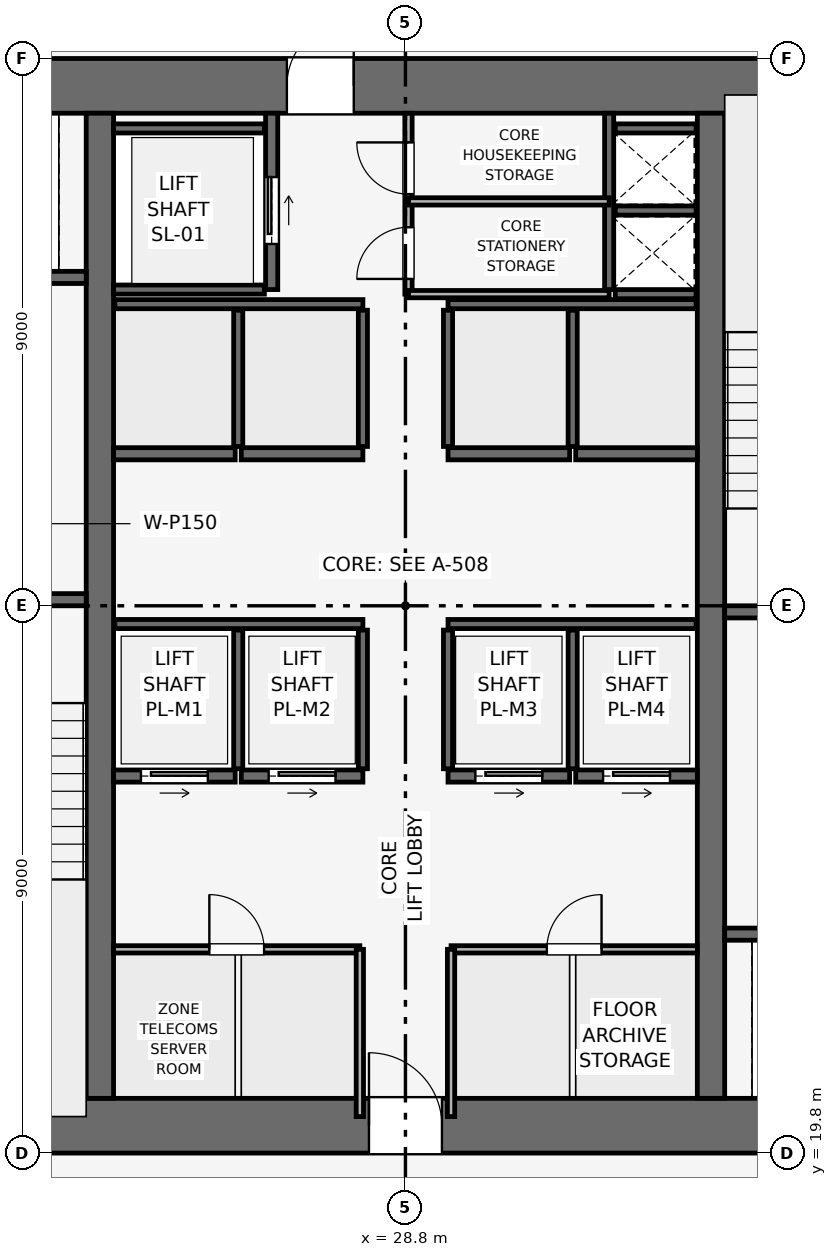
"""IFC4 building model, lengths in metres.
Left out: names, types, materials, properties, quantities, classifications, styles, units other than length and angle.
Written with IfcOpenShell. Run it as: python <this file> out.ifc"""

import sys

from ifc_helpers import new_model, si_unit, direction, frame, frame_2d, origin, place, context, subcontext, project, spatial, rectangle, extrude, element, fill, save


model = new_model("IFC4")
c1 = context("Model", 3, precision=1e-05, world=origin(), true_north=direction((0.0, 1.0)))
c2 = subcontext(c1, "Body", "Model", "MODEL_VIEW")
j1 = project(units=[si_unit("LENGTHUNIT", "METRE"), si_unit("PLANEANGLEUNIT", "RADIAN")], contexts=[c1])
p1 = place(None, origin())
s1 = spatial("IfcSite", under=j1, at=p1, CompositionType="ELEMENT")
p2 = place(p1, origin())
s2 = spatial("IfcBuilding", under=s1, at=p2, CompositionType="ELEMENT")
p3 = place(p2, frame((0.0, 0.0, 175.8)))
s3 = spatial("IfcBuildingStorey", under=s2, at=p3, CompositionType="ELEMENT", Elevation=175.8)
p4 = place(p3, frame((19.8, 20.25, 0.0), z_axis=(0.0, 0.0, 1.0), x_axis=(1.0, 0.0, 0.0)))
e1 = element("IfcWall", 1, at=p4, inside=s3, PredefinedType="SHEAR", context=c2, shape_type="SweptSolid", body=[
    extrude(rectangle(XDim=18.0, YDim=0.9, at=frame_2d((9.0, 0.0))), origin(), (0.0, 0.0, 1.0), 3.75),
])
p5 = place(p4, frame((8.4, 0.0, 0.0)))
e2 = element("IfcOpeningElement", 2, at=p5, cuts=e1, PredefinedType="OPENING", context=c2, shape_type="SweptSolid", body=[
    extrude(rectangle(XDim=1.2, YDim=2.2, at=frame_2d((0.6, 1.1))), frame((0.0, 0.46, 0.0), z_axis=(0.0, -1.0, 0.0), x_axis=(1.0, 0.0, 0.0)), (0.0, 0.0, 1.0), 0.92),
])
p6 = place(p3, frame((19.8, 37.35, 0.0), z_axis=(0.0, 0.0, 1.0), x_axis=(1.0, 0.0, 0.0)))
e3 = element("IfcWall", 3, at=p6, inside=s3, PredefinedType="SHEAR", context=c2, shape_type="SweptSolid", body=[
    extrude(rectangle(XDim=18.0, YDim=0.9, at=frame_2d((9.0, 0.0))), origin(), (0.0, 0.0, 1.0), 3.75),
])
p7 = place(p6, frame((7.05, 0.0, 0.0)))
e4 = element("IfcOpeningElement", 4, at=p7, cuts=e3, PredefinedType="OPENING", context=c2, shape_type="SweptSolid", body=[
    extrude(rectangle(XDim=1.1, YDim=2.15, at=frame_2d((0.55, 1.075))), frame((0.0, 0.46, 0.0), z_axis=(0.0, -1.0, 0.0), x_axis=(1.0, 0.0, 0.0)), (0.0, 0.0, 1.0), 0.92),
])
for number, where, z_axis, x_axis in (
    (5, (23.775, 20.7, 0.0), (0.0, 0.0, 1.0), (0.0, 1.0, 0.0)),
    (6, (33.825, 20.7, 0.0), (0.0, 0.0, 1.0), (0.0, 1.0, 0.0)),
):
    element("IfcWall", number, at=place(p3, frame(where, z_axis=z_axis, x_axis=x_axis)), inside=s3, PredefinedType="SHEAR", context=c2, shape_type="SweptSolid", body=[
        extrude(rectangle(XDim=16.2, YDim=0.45, at=frame_2d((8.1, 0.0))), origin(), (0.0, 0.0, 1.0), 3.75),
    ])
p8 = place(p3, frame((20.4, 28.9, 0.0), z_axis=(0.0, 0.0, 1.0), x_axis=(1.0, 0.0, 0.0)))
e7 = element("IfcWall", 7, at=p8, inside=s3, PredefinedType="SHEAR", context=c2, shape_type="SweptSolid", body=[
    extrude(rectangle(XDim=3.15, YDim=0.2, at=frame_2d((1.575, 0.0))), origin(), (0.0, 0.0, 1.0), 3.495),
])
p9 = place(p8, frame((0.8, 0.0, 0.0)))
e8 = element("IfcOpeningElement", 8, at=p9, cuts=e7, PredefinedType="OPENING", context=c2, shape_type="SweptSolid", body=[
    extrude(rectangle(XDim=1.0, YDim=2.1, at=frame_2d((0.5, 1.05))), frame((0.0, 0.11, 0.0), z_axis=(0.0, -1.0, 0.0), x_axis=(1.0, 0.0, 0.0)), (0.0, 0.0, 1.0), 0.22),
])
p10 = place(p3, frame((34.05, 28.7, 0.0), z_axis=(0.0, 0.0, 1.0), x_axis=(1.0, 0.0, 0.0)))
e9 = element("IfcWall", 9, at=p10, inside=s3, PredefinedType="SHEAR", context=c2, shape_type="SweptSolid", body=[
    extrude(rectangle(XDim=3.15, YDim=0.2, at=frame_2d((1.575, 0.0))), origin(), (0.0, 0.0, 1.0), 3.495),
])
p11 = place(p10, frame((0.8, 0.0, 0.0)))
e10 = element("IfcOpeningElement", 10, at=p11, cuts=e9, PredefinedType="OPENING", context=c2, shape_type="SweptSolid", body=[
    extrude(rectangle(XDim=1.0, YDim=2.1, at=frame_2d((0.5, 1.05))), frame((0.0, 0.11, 0.0), z_axis=(0.0, -1.0, 0.0), x_axis=(1.0, 0.0, 0.0)), (0.0, 0.0, 1.0), 0.22),
])
p12 = place(p3, frame((32.15, 34.0, 0.0), z_axis=(0.0, 0.0, 1.0), x_axis=(0.0, 1.0, 0.0)))
e11 = element("IfcWall", 11, at=p12, inside=s3, PredefinedType="SHEAR", context=c2, shape_type="SweptSolid", body=[
    extrude(rectangle(XDim=2.9, YDim=0.15, at=frame_2d((1.45, 0.0))), origin(), (0.0, 0.0, 1.0), 3.495),
])
for number, where, z_axis, x_axis in (
    (12, (32.25, 33.925, 0.0), (0.0, 0.0, 1.0), (1.0, 0.0, 0.0)),
    (13, (32.25, 35.3, 0.0), (0.0, 0.0, 1.0), (1.0, 0.0, 0.0)),
):
    element("IfcWall", number, at=place(p3, frame(where, z_axis=z_axis, x_axis=x_axis)), inside=s3, PredefinedType="SHEAR", context=c2, shape_type="SweptSolid", body=[
        extrude(rectangle(XDim=1.33, YDim=0.15, at=frame_2d((0.665, 0.0))), origin(), (0.0, 0.0, 1.0), 3.495),
    ])
p13 = place(p3, frame((20.5, 34.2, 0.0), z_axis=(0.0, 0.0, 1.0), x_axis=(1.0, 0.0, 0.0)))
e14 = element("IfcWall", 14, at=p13, inside=s3, PredefinedType="SHEAR", context=c2, shape_type="SweptSolid", body=[
    extrude(rectangle(XDim=3.05, YDim=0.2, at=frame_2d((1.525, 0.0))), origin(), (0.0, 0.0, 1.0), 3.495),
])
p14 = place(p13, frame((0.75, 0.0, 0.0)))
e15 = element("IfcOpeningElement", 15, at=p14, cuts=e14, PredefinedType="OPENING", context=c2, shape_type="SweptSolid", body=[
    extrude(rectangle(XDim=1.1, YDim=2.15, at=frame_2d((0.55, 1.075))), frame((0.0, 0.11, 0.0), z_axis=(0.0, -1.0, 0.0), x_axis=(1.0, 0.0, 0.0)), (0.0, 0.0, 1.0), 0.22),
])
p15 = place(p3, frame((34.05, 23.4, 0.0), z_axis=(0.0, 0.0, 1.0), x_axis=(1.0, 0.0, 0.0)))
e16 = element("IfcWall", 16, at=p15, inside=s3, PredefinedType="SHEAR", context=c2, shape_type="SweptSolid", body=[
    extrude(rectangle(XDim=3.05, YDim=0.2, at=frame_2d((1.525, 0.0))), origin(), (0.0, 0.0, 1.0), 3.495),
])
p16 = place(p15, frame((1.2, 0.0, 0.0)))
e17 = element("IfcOpeningElement", 17, at=p16, cuts=e16, PredefinedType="OPENING", context=c2, shape_type="SweptSolid", body=[
    extrude(rectangle(XDim=1.1, YDim=2.15, at=frame_2d((0.55, 1.075))), frame((0.0, 0.11, 0.0), z_axis=(0.0, -1.0, 0.0), x_axis=(1.0, 0.0, 0.0)), (0.0, 0.0, 1.0), 0.22),
])
p17 = place(p3, frame((26.6, 34.0, 0.0), z_axis=(0.0, 0.0, 1.0), x_axis=(0.0, 1.0, 0.0)))
e18 = element("IfcWall", 18, at=p17, inside=s3, PredefinedType="SHEAR", context=c2, shape_type="SweptSolid", body=[
    extrude(rectangle(XDim=2.9, YDim=0.2, at=frame_2d((1.45, 0.0))), origin(), (0.0, 0.0, 1.0), 3.495),
])
p18 = place(p17, frame((0.75, 0.0, 0.0)))
e19 = element("IfcOpeningElement", 19, at=p18, cuts=e18, PredefinedType="OPENING", context=c2, shape_type="SweptSolid", body=[
    extrude(rectangle(XDim=1.1, YDim=2.15, at=frame_2d((0.55, 1.075))), frame((0.0, 0.11, 0.0), z_axis=(0.0, -1.0, 0.0), x_axis=(1.0, 0.0, 0.0)), (0.0, 0.0, 1.0), 0.22),
])
for number, where, z_axis, x_axis in (
    (20, (24.0, 34.0, 0.0), (0.0, 0.0, 1.0), (1.0, 0.0, 0.0)),
    (21, (24.0, 36.65, 0.0), (0.0, 0.0, 1.0), (1.0, 0.0, 0.0)),
):
    element("IfcWall", number, at=place(p3, frame(where, z_axis=z_axis, x_axis=x_axis)), inside=s3, PredefinedType="SHEAR", context=c2, shape_type="SweptSolid", body=[
        extrude(rectangle(XDim=2.48, YDim=0.15, at=frame_2d((1.24, 0.0))), origin(), (0.0, 0.0, 1.0), 3.495),
    ])
p19 = place(p3, frame((24.0, 26.0, 0.0), z_axis=(0.0, 0.0, 1.0), x_axis=(1.0, 0.0, 0.0)))
e22 = element("IfcWall", 22, at=p19, inside=s3, PredefinedType="SHEAR", context=c2, shape_type="SweptSolid", body=[
    extrude(rectangle(XDim=2.0, YDim=0.2, at=frame_2d((1.0, 0.0))), origin(), (0.0, 0.0, 1.0), 3.495),
])
p20 = place(p19, frame((0.45, 0.0, 0.0)))
e23 = element("IfcOpeningElement", 23, at=p20, cuts=e22, PredefinedType="OPENING", context=c2, shape_type="SweptSolid", body=[
    extrude(rectangle(XDim=1.1, YDim=2.15, at=frame_2d((0.55, 1.075))), frame((0.0, 0.11, 0.0), z_axis=(0.0, -1.0, 0.0), x_axis=(1.0, 0.0, 0.0)), (0.0, 0.0, 1.0), 0.22),
])
p21 = place(p3, frame((26.1, 26.0, 0.0), z_axis=(0.0, 0.0, 1.0), x_axis=(1.0, 0.0, 0.0)))
e24 = element("IfcWall", 24, at=p21, inside=s3, PredefinedType="SHEAR", context=c2, shape_type="SweptSolid", body=[
    extrude(rectangle(XDim=2.0, YDim=0.2, at=frame_2d((1.0, 0.0))), origin(), (0.0, 0.0, 1.0), 3.495),
])
p22 = place(p21, frame((0.45, 0.0, 0.0)))
e25 = element("IfcOpeningElement", 25, at=p22, cuts=e24, PredefinedType="OPENING", context=c2, shape_type="SweptSolid", body=[
    extrude(rectangle(XDim=1.1, YDim=2.15, at=frame_2d((0.55, 1.075))), frame((0.0, 0.11, 0.0), z_axis=(0.0, -1.0, 0.0), x_axis=(1.0, 0.0, 0.0)), (0.0, 0.0, 1.0), 0.22),
])
p23 = place(p3, frame((29.5, 26.0, 0.0), z_axis=(0.0, 0.0, 1.0), x_axis=(1.0, 0.0, 0.0)))
e26 = element("IfcWall", 26, at=p23, inside=s3, PredefinedType="SHEAR", context=c2, shape_type="SweptSolid", body=[
    extrude(rectangle(XDim=2.0, YDim=0.2, at=frame_2d((1.0, 0.0))), origin(), (0.0, 0.0, 1.0), 3.495),
])
p24 = place(p23, frame((0.45, 0.0, 0.0)))
e27 = element("IfcOpeningElement", 27, at=p24, cuts=e26, PredefinedType="OPENING", context=c2, shape_type="SweptSolid", body=[
    extrude(rectangle(XDim=1.1, YDim=2.15, at=frame_2d((0.55, 1.075))), frame((0.0, 0.11, 0.0), z_axis=(0.0, -1.0, 0.0), x_axis=(1.0, 0.0, 0.0)), (0.0, 0.0, 1.0), 0.22),
])
p25 = place(p3, frame((31.6, 26.0, 0.0), z_axis=(0.0, 0.0, 1.0), x_axis=(1.0, 0.0, 0.0)))
e28 = element("IfcWall", 28, at=p25, inside=s3, PredefinedType="SHEAR", context=c2, shape_type="SweptSolid", body=[
    extrude(rectangle(XDim=2.0, YDim=0.2, at=frame_2d((1.0, 0.0))), origin(), (0.0, 0.0, 1.0), 3.495),
])
p26 = place(p25, frame((0.45, 0.0, 0.0)))
e29 = element("IfcOpeningElement", 29, at=p26, cuts=e28, PredefinedType="OPENING", context=c2, shape_type="SweptSolid", body=[
    extrude(rectangle(XDim=1.1, YDim=2.15, at=frame_2d((0.55, 1.075))), frame((0.0, 0.11, 0.0), z_axis=(0.0, -1.0, 0.0), x_axis=(1.0, 0.0, 0.0)), (0.0, 0.0, 1.0), 0.22),
])
for number, where, z_axis, x_axis in (
    (30, (24.0, 31.3, 0.0), (0.0, 0.0, 1.0), (1.0, 0.0, 0.0)),
    (31, (26.1, 31.3, 0.0), (0.0, 0.0, 1.0), (1.0, 0.0, 0.0)),
    (32, (29.5, 31.3, 0.0), (0.0, 0.0, 1.0), (1.0, 0.0, 0.0)),
    (33, (31.6, 31.3, 0.0), (0.0, 0.0, 1.0), (1.0, 0.0, 0.0)),
):
    element("IfcWall", number, at=place(p3, frame(where, z_axis=z_axis, x_axis=x_axis)), inside=s3, PredefinedType="SHEAR", context=c2, shape_type="SweptSolid", body=[
        extrude(rectangle(XDim=2.0, YDim=0.2, at=frame_2d((1.0, 0.0))), origin(), (0.0, 0.0, 1.0), 3.495),
    ])
p27 = place(p3, frame((32.25, 36.65, 0.0), z_axis=(0.0, 0.0, 1.0), x_axis=(1.0, 0.0, 0.0)))
e34 = element("IfcWall", 34, at=p27, inside=s3, PredefinedType="SHEAR", context=c2, shape_type="SweptSolid", body=[
    extrude(rectangle(XDim=1.33, YDim=0.15, at=frame_2d((0.665, 0.0))), origin(), (0.0, 0.0, 1.0), 3.495),
])
for number, where, z_axis, x_axis in (
    (35, (24.02, 28.5, 0.0), (0.0, 0.0, 1.0), (1.0, 0.0, 0.0)),
    (36, (29.5, 28.5, 0.0), (0.0, 0.0, 1.0), (1.0, 0.0, 0.0)),
):
    element("IfcWall", number, at=place(p3, frame(where, z_axis=z_axis, x_axis=x_axis)), inside=s3, PredefinedType="SHEAR", context=c2, shape_type="SweptSolid", body=[
        extrude(rectangle(XDim=4.08, YDim=0.15, at=frame_2d((2.04, 0.0))), origin(), (0.0, 0.0, 1.0), 3.495),
    ])
for number, where, z_axis, x_axis in (
    (37, (26.05, 26.12, 0.0), (0.0, 0.0, 1.0), (0.0, 1.0, 0.0)),
    (38, (28.1, 26.12, 0.0), (0.0, 0.0, 1.0), (0.0, 1.0, 0.0)),
    (39, (29.5, 26.12, 0.0), (0.0, 0.0, 1.0), (0.0, 1.0, 0.0)),
    (40, (31.55, 26.12, 0.0), (0.0, 0.0, 1.0), (0.0, 1.0, 0.0)),
):
    element("IfcWall", number, at=place(p3, frame(where, z_axis=z_axis, x_axis=x_axis)), inside=s3, PredefinedType="SHEAR", context=c2, shape_type="SweptSolid", body=[
        extrude(rectangle(XDim=2.28, YDim=0.15, at=frame_2d((1.14, 0.0))), origin(), (0.0, 0.0, 1.0), 3.495),
    ])
for number, where, z_axis, x_axis in (
    (41, (24.02, 33.76, 0.0), (0.0, 0.0, 1.0), (1.0, 0.0, 0.0)),
    (42, (29.5, 33.76, 0.0), (0.0, 0.0, 1.0), (1.0, 0.0, 0.0)),
):
    element("IfcWall", number, at=place(p3, frame(where, z_axis=z_axis, x_axis=x_axis)), inside=s3, PredefinedType="SHEAR", context=c2, shape_type="SweptSolid", body=[
        extrude(rectangle(XDim=4.08, YDim=0.15, at=frame_2d((2.04, 0.0))), origin(), (0.0, 0.0, 1.0), 3.495),
    ])
for number, where, z_axis, x_axis in (
    (43, (26.05, 31.42, 0.0), (0.0, 0.0, 1.0), (0.0, 1.0, 0.0)),
    (44, (28.1, 31.42, 0.0), (0.0, 0.0, 1.0), (0.0, 1.0, 0.0)),
    (45, (29.5, 31.42, 0.0), (0.0, 0.0, 1.0), (0.0, 1.0, 0.0)),
    (46, (31.55, 31.42, 0.0), (0.0, 0.0, 1.0), (0.0, 1.0, 0.0)),
):
    element("IfcWall", number, at=place(p3, frame(where, z_axis=z_axis, x_axis=x_axis)), inside=s3, PredefinedType="SHEAR", context=c2, shape_type="SweptSolid", body=[
        extrude(rectangle(XDim=2.24, YDim=0.15, at=frame_2d((1.12, 0.0))), origin(), (0.0, 0.0, 1.0), 3.495),
    ])
p28 = place(p3, frame((28.85, 33.925, 0.0), z_axis=(0.0, 0.0, 1.0), x_axis=(0.0, 1.0, 0.0)))
e47 = element("IfcWall", 47, at=p28, inside=s3, PredefinedType="PARTITIONING", context=c2, shape_type="SweptSolid", body=[
    extrude(rectangle(XDim=2.975, YDim=0.12, at=frame_2d((1.487, 0.0))), origin(), (0.0, 0.0, 1.0), 3.495),
])
p29 = place(p28, frame((0.25, 0.0, 0.0)))
e48 = element("IfcOpeningElement", 48, at=p29, cuts=e47, PredefinedType="OPENING", context=c2, shape_type="SweptSolid", body=[
    extrude(rectangle(XDim=0.85, YDim=2.1, at=frame_2d((0.425, 1.05))), frame((0.0, 0.07, 0.0), z_axis=(0.0, -1.0, 0.0), x_axis=(1.0, 0.0, 0.0)), (0.0, 0.0, 1.0), 0.14),
])
p30 = place(p28, frame((1.645, 0.0, 0.0)))
e49 = element("IfcOpeningElement", 49, at=p30, cuts=e47, PredefinedType="OPENING", context=c2, shape_type="SweptSolid", body=[
    extrude(rectangle(XDim=0.85, YDim=2.1, at=frame_2d((0.425, 1.05))), frame((0.0, 0.07, 0.0), z_axis=(0.0, -1.0, 0.0), x_axis=(1.0, 0.0, 0.0)), (0.0, 0.0, 1.0), 0.14),
])
for number, where, z_axis, x_axis in (
    (50, (28.85, 35.45, 0.0), (0.0, 0.0, 1.0), (1.0, 0.0, 0.0)),
    (51, (28.85, 33.925, 0.0), (0.0, 0.0, 1.0), (1.0, 0.0, 0.0)),
):
    element("IfcWall", number, at=place(p3, frame(where, z_axis=z_axis, x_axis=x_axis)), inside=s3, PredefinedType="PARTITIONING", context=c2, shape_type="SweptSolid", body=[
        extrude(rectangle(XDim=3.3, YDim=0.12, at=frame_2d((1.65, 0.0))), origin(), (0.0, 0.0, 1.0), 3.495),
    ])
p31 = place(p3, frame((24.0, 23.15, 0.0), z_axis=(0.0, 0.0, 1.0), x_axis=(1.0, 0.0, 0.0)))
e52 = element("IfcWall", 52, at=p31, inside=s3, PredefinedType="PARTITIONING", context=c2, shape_type="SweptSolid", body=[
    extrude(rectangle(XDim=4.05, YDim=0.12, at=frame_2d((2.025, 0.0))), origin(), (0.0, 0.0, 1.0), 3.495),
])
p32 = place(p31, frame((1.575, 0.0, 0.0)))
e53 = element("IfcOpeningElement", 53, at=p32, cuts=e52, PredefinedType="OPENING", context=c2, shape_type="SweptSolid", body=[
    extrude(rectangle(XDim=0.9, YDim=2.1, at=frame_2d((0.45, 1.05))), frame((0.0, 0.07, 0.0), z_axis=(0.0, -1.0, 0.0), x_axis=(1.0, 0.0, 0.0)), (0.0, 0.0, 1.0), 0.14),
])
p33 = place(p3, frame((28.05, 20.4, 0.0), z_axis=(0.0, 0.0, 1.0), x_axis=(0.0, 1.0, 0.0)))
e54 = element("IfcWall", 54, at=p33, inside=s3, PredefinedType="PARTITIONING", context=c2, shape_type="SweptSolid", body=[
    extrude(rectangle(XDim=2.75, YDim=0.12, at=frame_2d((1.375, 0.0))), origin(), (0.0, 0.0, 1.0), 3.495),
])
p34 = place(p3, frame((29.55, 23.15, 0.0), z_axis=(0.0, 0.0, 1.0), x_axis=(1.0, 0.0, 0.0)))
e55 = element("IfcWall", 55, at=p34, inside=s3, PredefinedType="PARTITIONING", context=c2, shape_type="SweptSolid", body=[
    extrude(rectangle(XDim=4.05, YDim=0.12, at=frame_2d((2.025, 0.0))), origin(), (0.0, 0.0, 1.0), 3.495),
])
p35 = place(p34, frame((1.575, 0.0, 0.0)))
e56 = element("IfcOpeningElement", 56, at=p35, cuts=e55, PredefinedType="OPENING", context=c2, shape_type="SweptSolid", body=[
    extrude(rectangle(XDim=0.9, YDim=2.1, at=frame_2d((0.45, 1.05))), frame((0.0, 0.07, 0.0), z_axis=(0.0, -1.0, 0.0), x_axis=(1.0, 0.0, 0.0)), (0.0, 0.0, 1.0), 0.14),
])
p36 = place(p3, frame((29.55, 20.4, 0.0), z_axis=(0.0, 0.0, 1.0), x_axis=(0.0, 1.0, 0.0)))
e57 = element("IfcWall", 57, at=p36, inside=s3, PredefinedType="PARTITIONING", context=c2, shape_type="SweptSolid", body=[
    extrude(rectangle(XDim=2.75, YDim=0.12, at=frame_2d((1.375, 0.0))), origin(), (0.0, 0.0, 1.0), 3.495),
])
p37 = place(p18, origin())
e58 = element("IfcDoor", 58, at=p37, inside=s3, OperationType="SLIDING_TO_RIGHT", PredefinedType="DOOR", context=c2, shape_type="SweptSolid", body=[
    extrude(rectangle(XDim=1.1, YDim=2.15, at=frame_2d((0.55, 1.075))), frame((0.0, 0.025, 0.0), z_axis=(0.0, -1.0, 0.0), x_axis=(1.0, 0.0, 0.0)), (0.0, 0.0, 1.0), 0.05),
])
fill(e19, e58)
p38 = place(p20, origin())
e59 = element("IfcDoor", 59, at=p38, inside=s3, OperationType="SLIDING_TO_RIGHT", PredefinedType="DOOR", context=c2, shape_type="SweptSolid", body=[
    extrude(rectangle(XDim=1.1, YDim=2.15, at=frame_2d((0.55, 1.075))), frame((0.0, 0.025, 0.0), z_axis=(0.0, -1.0, 0.0), x_axis=(1.0, 0.0, 0.0)), (0.0, 0.0, 1.0), 0.05),
])
fill(e23, e59)
p39 = place(p22, origin())
e60 = element("IfcDoor", 60, at=p39, inside=s3, OperationType="SLIDING_TO_RIGHT", PredefinedType="DOOR", context=c2, shape_type="SweptSolid", body=[
    extrude(rectangle(XDim=1.1, YDim=2.15, at=frame_2d((0.55, 1.075))), frame((0.0, 0.025, 0.0), z_axis=(0.0, -1.0, 0.0), x_axis=(1.0, 0.0, 0.0)), (0.0, 0.0, 1.0), 0.05),
])
fill(e25, e60)
p40 = place(p24, origin())
e61 = element("IfcDoor", 61, at=p40, inside=s3, OperationType="SLIDING_TO_RIGHT", PredefinedType="DOOR", context=c2, shape_type="SweptSolid", body=[
    extrude(rectangle(XDim=1.1, YDim=2.15, at=frame_2d((0.55, 1.075))), frame((0.0, 0.025, 0.0), z_axis=(0.0, -1.0, 0.0), x_axis=(1.0, 0.0, 0.0)), (0.0, 0.0, 1.0), 0.05),
])
fill(e27, e61)
p41 = place(p26, origin())
e62 = element("IfcDoor", 62, at=p41, inside=s3, OperationType="SLIDING_TO_RIGHT", PredefinedType="DOOR", context=c2, shape_type="SweptSolid", body=[
    extrude(rectangle(XDim=1.1, YDim=2.15, at=frame_2d((0.55, 1.075))), frame((0.0, 0.025, 0.0), z_axis=(0.0, -1.0, 0.0), x_axis=(1.0, 0.0, 0.0)), (0.0, 0.0, 1.0), 0.05),
])
fill(e29, e62)
p42 = place(p29, origin())
e63 = element("IfcDoor", 63, at=p42, inside=s3, OperationType="SINGLE_SWING_LEFT", PredefinedType="DOOR", context=c2, shape_type="SweptSolid", body=[
    extrude(rectangle(XDim=0.85, YDim=2.1, at=frame_2d((0.425, 1.05))), frame((0.0, 0.025, 0.0), z_axis=(0.0, -1.0, 0.0), x_axis=(1.0, 0.0, 0.0)), (0.0, 0.0, 1.0), 0.05),
])
fill(e48, e63)
p43 = place(p30, origin())
e64 = element("IfcDoor", 64, at=p43, inside=s3, OperationType="SINGLE_SWING_RIGHT", PredefinedType="DOOR", context=c2, shape_type="SweptSolid", body=[
    extrude(rectangle(XDim=0.85, YDim=2.1, at=frame_2d((0.425, 1.05))), frame((0.0, 0.025, 0.0), z_axis=(0.0, -1.0, 0.0), x_axis=(1.0, 0.0, 0.0)), (0.0, 0.0, 1.0), 0.05),
])
fill(e49, e64)
p44 = place(p32, origin())
e65 = element("IfcDoor", 65, at=p44, inside=s3, OperationType="SINGLE_SWING_LEFT", PredefinedType="DOOR", context=c2, shape_type="SweptSolid", body=[
    extrude(rectangle(XDim=0.9, YDim=2.1, at=frame_2d((0.45, 1.05))), frame((0.0, 0.025, 0.0), z_axis=(0.0, -1.0, 0.0), x_axis=(1.0, 0.0, 0.0)), (0.0, 0.0, 1.0), 0.05),
])
fill(e53, e65)
p45 = place(p35, origin())
e66 = element("IfcDoor", 66, at=p45, inside=s3, OperationType="SINGLE_SWING_RIGHT", PredefinedType="DOOR", context=c2, shape_type="SweptSolid", body=[
    extrude(rectangle(XDim=0.9, YDim=2.1, at=frame_2d((0.45, 1.05))), frame((0.0, 0.025, 0.0), z_axis=(0.0, -1.0, 0.0), x_axis=(1.0, 0.0, 0.0)), (0.0, 0.0, 1.0), 0.05),
])
fill(e56, e66)
p46 = place(p5, origin())
e67 = element("IfcDoor", 67, at=p46, inside=s3, OperationType="SINGLE_SWING_LEFT", PredefinedType="DOOR", context=c2, shape_type="SweptSolid", body=[
    extrude(rectangle(XDim=1.2, YDim=2.2, at=frame_2d((0.6, 1.1))), frame((0.0, 0.025, 0.0), z_axis=(0.0, -1.0, 0.0), x_axis=(1.0, 0.0, 0.0)), (0.0, 0.0, 1.0), 0.05),
])
fill(e2, e67)
p47 = place(p7, origin())
e68 = element("IfcDoor", 68, at=p47, inside=s3, OperationType="SINGLE_SWING_RIGHT", PredefinedType="DOOR", context=c2, shape_type="SweptSolid", body=[
    extrude(rectangle(XDim=1.1, YDim=2.15, at=frame_2d((0.55, 1.075))), frame((0.0, 0.025, 0.0), z_axis=(0.0, -1.0, 0.0), x_axis=(1.0, 0.0, 0.0)), (0.0, 0.0, 1.0), 0.05),
])
fill(e4, e68)
save(model, sys.argv[1])
